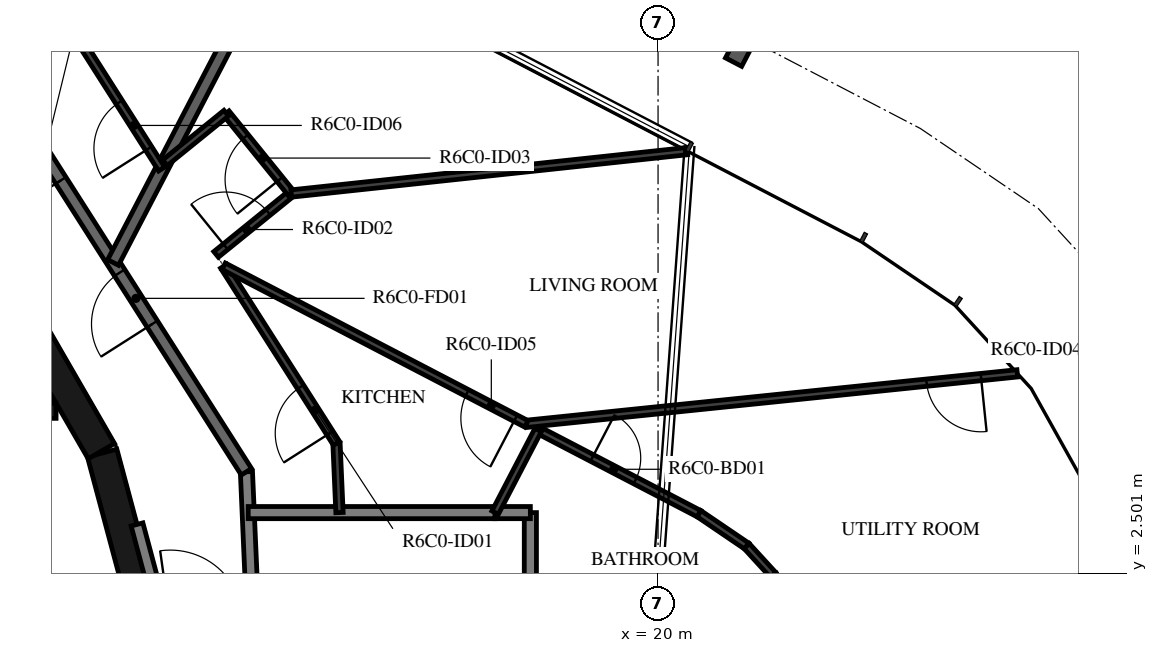
"""IFC4 building model, lengths in metres.
Left out: names, types, materials, properties, quantities, classifications, styles, units other than length and angle.
Written with IfcOpenShell. Run it as: python <this file> out.ifc"""

import sys

from ifc_helpers import new_model, si_unit, direction, frame, frame_2d, origin, origin_2d, place, context, subcontext, project, spatial, rectangle, i_section, extrude, element, fill, save


model = new_model("IFC4")
c1 = context("Model", 3, precision=1e-05, world=origin(), true_north=direction((0.0, 1.0)))
c2 = subcontext(c1, "Body", "Model", "MODEL_VIEW")
j1 = project(units=[si_unit("LENGTHUNIT", "METRE"), si_unit("PLANEANGLEUNIT", "RADIAN")], contexts=[c1])
p1 = place(None, origin())
s1 = spatial("IfcSite", under=j1, at=p1, CompositionType="ELEMENT")
p2 = place(p1, origin())
s2 = spatial("IfcBuilding", under=s1, at=p2, CompositionType="ELEMENT")
p3 = place(p2, frame((0.0, 0.0, 254.7)))
s3 = spatial("IfcBuildingStorey", under=s2, at=p3, CompositionType="ELEMENT", Elevation=254.7)
p4 = place(p3, frame((21.45, 11.308, -0.38), z_axis=(0.0, 0.0, 1.0), x_axis=(0.887010710334, -0.461748849216, 0.0)))
e1 = element("IfcColumn", 1, at=p4, inside=s3, PredefinedType="COLUMN", context=c2, shape_type="SweptSolid", body=[
    extrude(i_section(OverallWidth=0.3, OverallDepth=0.9, WebThickness=0.019, FlangeThickness=0.035, FilletRadius=0.03, at=origin_2d()), origin(), (0.0, 0.0, 1.0), 2.616),
])
for number, where, z_axis, x_axis in (
    (2, (11.643, 1.55, 0.0), (0.0, 0.0, 1.0), (-0.259, 0.966, 0.0)),
    (3, (10.845, 4.51, 0.0), (0.0, 0.0, 1.0), (-0.5, 0.866, 0.0)),
):
    element("IfcWall", number, at=place(p3, frame(where, z_axis=z_axis, x_axis=x_axis)), inside=s3, PredefinedType="SHEAR", context=c2, shape_type="SweptSolid", body=[
        extrude(rectangle(XDim=3.033, YDim=0.5, at=frame_2d((1.516, 0.0))), origin(), (0.0, 0.0, 1.0), 3.05),
    ])
p5 = place(p3, frame((7.0, 5.175, 0.0), z_axis=(0.0, 0.0, 1.0), x_axis=(1.0, 0.0, 0.0)))
e4 = element("IfcWall", 4, at=p5, inside=s3, PredefinedType="SHEAR", context=c2, shape_type="SweptSolid", body=[
    extrude(rectangle(XDim=3.1, YDim=0.25, at=frame_2d((1.55, 0.0))), origin(), (0.0, 0.0, 1.0), 3.05),
])
p6 = place(p3, frame((11.87, 1.668, 0.0), z_axis=(0.0, 0.0, 1.0), x_axis=(-0.258836880648, 0.965921047093, 0.0)))
e5 = element("IfcWall", 5, at=p6, inside=s3, PredefinedType="STANDARD", context=c2, shape_type="SweptSolid", body=[
    extrude(rectangle(XDim=1.695, YDim=0.2, at=frame_2d((0.848, 0.0))), origin(), (0.0, 0.0, 1.0), 3.05),
])
p7 = place(p3, frame((13.331, 1.874, 0.0), z_axis=(0.0, 0.0, 1.0), x_axis=(-0.043621457762, 0.999048131184, 0.0)))
e6 = element("IfcWall", 6, at=p7, inside=s3, PredefinedType="STANDARD", context=c2, shape_type="SweptSolid", body=[
    extrude(rectangle(XDim=2.3, YDim=0.2, at=frame_2d((1.15, 0.0))), origin(), (0.0, 0.0, 1.0), 3.05),
])
p8 = place(p3, frame((13.231, 4.172, 0.0), z_axis=(0.0, 0.0, 1.0), x_axis=(-0.537304397561, 0.843388394728, 0.0)))
e7 = element("IfcWall", 7, at=p8, inside=s3, PredefinedType="STANDARD", context=c2, shape_type="SweptSolid", body=[
    extrude(rectangle(XDim=7.181, YDim=0.2, at=frame_2d((3.59, 0.0))), origin(), (0.0, 0.0, 1.0), 3.05),
])
p9 = place(p8, frame((2.881, 0.0, 0.0)))
e8 = element("IfcOpeningElement", 8, at=p9, cuts=e7, PredefinedType="OPENING", context=c2, shape_type="SweptSolid", body=[
    extrude(rectangle(XDim=1.0, YDim=2.1, at=frame_2d((0.5, 1.05))), frame((0.0, 0.11, 0.0), z_axis=(0.0, -1.0, 0.0), x_axis=(1.0, 0.0, 0.0)), (0.0, 0.0, 1.0), 0.22),
])
p10 = place(p8, frame((5.681, 0.0, 0.0)))
e9 = element("IfcOpeningElement", 9, at=p10, cuts=e7, PredefinedType="OPENING", context=c2, shape_type="SweptSolid", body=[
    extrude(rectangle(XDim=1.0, YDim=2.1, at=frame_2d((0.5, 1.05))), frame((0.0, 0.11, 0.0), z_axis=(0.0, -1.0, 0.0), x_axis=(1.0, 0.0, 0.0)), (0.0, 0.0, 1.0), 0.22),
])
p11 = place(p3, frame((17.321, 3.5, 0.0), z_axis=(0.0, 0.0, 1.0), x_axis=(-1.0, 0.0, 0.0)))
e10 = element("IfcWall", 10, at=p11, inside=s3, PredefinedType="STANDARD", context=c2, shape_type="SweptSolid", body=[
    extrude(rectangle(XDim=4.061, YDim=0.2, at=frame_2d((2.03, 0.0))), origin(), (0.0, 0.0, 1.0), 3.05),
])
p12 = place(p3, frame((17.9, -1.772, 0.0), z_axis=(0.0, 0.0, 1.0), x_axis=(0.0, 1.0, 0.0)))
e11 = element("IfcWall", 11, at=p12, inside=s3, PredefinedType="STANDARD", context=c2, shape_type="SweptSolid", body=[
    extrude(rectangle(XDim=5.272, YDim=0.2, at=frame_2d((2.636, 0.0))), origin(), (0.0, 0.0, 1.0), 3.05),
])
p13 = place(p3, frame((17.9, 3.5, 0.0), z_axis=(0.0, 0.0, 1.0), x_axis=(-1.0, 0.0, 0.0)))
e12 = element("IfcWall", 12, at=p13, inside=s3, PredefinedType="STANDARD", context=c2, shape_type="SweptSolid", body=[
    extrude(rectangle(XDim=0.579, YDim=0.2, at=frame_2d((0.29, 0.0))), origin(), (0.0, 0.0, 1.0), 3.05),
])
p14 = place(p3, frame((13.801, 12.922, 0.0), z_axis=(0.0, 0.0, 1.0), x_axis=(-0.461726485624, -0.887022351733, 0.0)))
e13 = element("IfcWall", 13, at=p14, inside=s3, PredefinedType="STANDARD", context=c2, shape_type="SweptSolid", body=[
    extrude(rectangle(XDim=5.984, YDim=0.2, at=frame_2d((2.992, 0.0))), origin(), (0.0, 0.0, 1.0), 3.05),
])
p15 = place(p3, frame((14.761, 3.5, 0.0), z_axis=(0.0, 0.0, 1.0), x_axis=(-0.04369750018, 0.999044808043, 0.0)))
e14 = element("IfcWall", 14, at=p15, inside=s3, PredefinedType="PARTITIONING", context=c2, shape_type="SweptSolid", body=[
    extrude(rectangle(XDim=1.14, YDim=0.12, at=frame_2d((0.57, 0.0))), origin(), (0.0, 0.0, 1.0), 3.05),
])
p16 = place(p3, frame((14.712, 4.639, 0.0), z_axis=(0.0, 0.0, 1.0), x_axis=(-0.537287126609, 0.843399397427, 0.0)))
e15 = element("IfcWall", 15, at=p16, inside=s3, PredefinedType="PARTITIONING", context=c2, shape_type="SweptSolid", body=[
    extrude(rectangle(XDim=3.453, YDim=0.12, at=frame_2d((1.727, 0.0))), origin(), (0.0, 0.0, 1.0), 3.05),
])
p17 = place(p16, frame((0.2, 0.0, 0.0)))
e16 = element("IfcOpeningElement", 16, at=p17, cuts=e15, PredefinedType="OPENING", context=c2, shape_type="SweptSolid", body=[
    extrude(rectangle(XDim=0.9, YDim=2.1, at=frame_2d((0.45, 1.05))), frame((0.0, 0.07, 0.0), z_axis=(0.0, -1.0, 0.0), x_axis=(1.0, 0.0, 0.0)), (0.0, 0.0, 1.0), 0.14),
])
p18 = place(p3, frame((12.732, 7.746, 0.0), z_axis=(0.0, 0.0, 1.0), x_axis=(0.777187694298, 0.62926885179, 0.0)))
e17 = element("IfcWall", 17, at=p18, inside=s3, PredefinedType="PARTITIONING", context=c2, shape_type="SweptSolid", body=[
    extrude(rectangle(XDim=1.591, YDim=0.12, at=frame_2d((0.795, 0.0))), origin(), (0.0, 0.0, 1.0), 3.05),
])
p19 = place(p18, frame((0.2, 0.0, 0.0)))
e18 = element("IfcOpeningElement", 18, at=p19, cuts=e17, PredefinedType="OPENING", context=c2, shape_type="SweptSolid", body=[
    extrude(rectangle(XDim=0.9, YDim=2.1, at=frame_2d((0.45, 1.05))), frame((0.0, 0.07, 0.0), z_axis=(0.0, -1.0, 0.0), x_axis=(1.0, 0.0, 0.0)), (0.0, 0.0, 1.0), 0.14),
])
p20 = place(p3, frame((13.969, 8.747, 0.0), z_axis=(0.0, 0.0, 1.0), x_axis=(-0.629359312443, 0.777114441921, 0.0)))
e19 = element("IfcWall", 19, at=p20, inside=s3, PredefinedType="PARTITIONING", context=c2, shape_type="SweptSolid", body=[
    extrude(rectangle(XDim=1.7, YDim=0.12, at=frame_2d((0.85, 0.0))), origin(), (0.0, 0.0, 1.0), 3.05),
])
p21 = place(p20, frame((0.3, 0.0, 0.0)))
e20 = element("IfcOpeningElement", 20, at=p21, cuts=e19, PredefinedType="OPENING", context=c2, shape_type="SweptSolid", body=[
    extrude(rectangle(XDim=0.9, YDim=2.1, at=frame_2d((0.45, 1.05))), frame((0.0, 0.07, 0.0), z_axis=(0.0, -1.0, 0.0), x_axis=(1.0, 0.0, 0.0)), (0.0, 0.0, 1.0), 0.14),
])
p22 = place(p3, frame((12.898, 10.069, 0.0), z_axis=(0.0, 0.0, 1.0), x_axis=(-0.777069405334, -0.629414918232, 0.0)))
e21 = element("IfcWall", 21, at=p22, inside=s3, PredefinedType="PARTITIONING", context=c2, shape_type="SweptSolid", body=[
    extrude(rectangle(XDim=1.296, YDim=0.12, at=frame_2d((0.648, 0.0))), origin(), (0.0, 0.0, 1.0), 3.05),
])
p23 = place(p3, frame((18.028, 4.859, 0.0), z_axis=(0.0, 0.0, 1.0), x_axis=(0.88702512027, -0.46172116695, 0.0)))
e22 = element("IfcWall", 22, at=p23, inside=s3, PredefinedType="PARTITIONING", context=c2, shape_type="SweptSolid", body=[
    extrude(rectangle(XDim=2.983, YDim=0.12, at=frame_2d((1.492, 0.0))), origin(), (0.0, 0.0, 1.0), 3.05),
])
p24 = place(p23, frame((1.0, 0.0, 0.0)))
e23 = element("IfcOpeningElement", 23, at=p24, cuts=e22, PredefinedType="OPENING", context=c2, shape_type="SweptSolid", body=[
    extrude(rectangle(XDim=0.8, YDim=2.1, at=frame_2d((0.4, 1.05))), frame((0.0, 0.07, 0.0), z_axis=(0.0, -1.0, 0.0), x_axis=(1.0, 0.0, 0.0)), (0.0, 0.0, 1.0), 0.14),
])
p25 = place(p3, frame((20.674, 3.481, 0.0), z_axis=(0.0, 0.0, 1.0), x_axis=(0.827420148173, -0.56158338508, 0.0)))
e24 = element("IfcWall", 24, at=p25, inside=s3, PredefinedType="PARTITIONING", context=c2, shape_type="SweptSolid", body=[
    extrude(rectangle(XDim=0.947, YDim=0.12, at=frame_2d((0.473, 0.0))), origin(), (0.0, 0.0, 1.0), 3.05),
])
for number, where, z_axis, x_axis in (
    (25, (21.458, 2.95, 0.0), (0.0, 0.0, 1.0), (0.676, -0.737, 0.0)),
    (26, (21.891, 2.477, 0.0), (0.0, 0.0, 1.0), (0.487, -0.873, 0.0)),
):
    element("IfcWall", number, at=place(p3, frame(where, z_axis=z_axis, x_axis=x_axis)), inside=s3, PredefinedType="PARTITIONING", context=c2, shape_type="SweptSolid", body=[
        extrude(rectangle(XDim=0.642, YDim=0.12, at=frame_2d((0.321, 0.0))), origin(), (0.0, 0.0, 1.0), 3.05),
    ])
p26 = place(p3, frame((25.908, 5.79, 0.0), z_axis=(0.0, 0.0, 1.0), x_axis=(-0.994752982456, -0.102305932847, 0.0)))
e27 = element("IfcWall", 27, at=p26, inside=s3, PredefinedType="PARTITIONING", context=c2, shape_type="SweptSolid", body=[
    extrude(rectangle(XDim=8.116, YDim=0.12, at=frame_2d((4.058, 0.0))), origin(), (0.0, 0.0, 1.0), 3.05),
])
p27 = place(p26, frame((0.6, 0.0, 0.0)))
e28 = element("IfcOpeningElement", 28, at=p27, cuts=e27, PredefinedType="OPENING", context=c2, shape_type="SweptSolid", body=[
    extrude(rectangle(XDim=0.9, YDim=2.1, at=frame_2d((0.45, 1.05))), frame((0.0, 0.07, 0.0), z_axis=(0.0, -1.0, 0.0), x_axis=(1.0, 0.0, 0.0)), (0.0, 0.0, 1.0), 0.14),
])
p28 = place(p3, frame((18.028, 4.859, 0.0), z_axis=(0.0, 0.0, 1.0), x_axis=(-0.461688901614, -0.887041914526, 0.0)))
e29 = element("IfcWall", 29, at=p28, inside=s3, PredefinedType="PARTITIONING", context=c2, shape_type="SweptSolid", body=[
    extrude(rectangle(XDim=1.532, YDim=0.12, at=frame_2d((0.766, 0.0))), origin(), (0.0, 0.0, 1.0), 3.05),
])
p29 = place(p3, frame((17.834, 4.96, 0.0), z_axis=(0.0, 0.0, 1.0), x_axis=(-0.887008743782, 0.461752626906, 0.0)))
e30 = element("IfcWall", 30, at=p29, inside=s3, PredefinedType="PARTITIONING", context=c2, shape_type="SweptSolid", body=[
    extrude(rectangle(XDim=5.612, YDim=0.12, at=frame_2d((2.806, 0.0))), origin(), (0.0, 0.0, 1.0), 3.05),
])
p30 = place(p29, frame((0.2, 0.0, 0.0)))
e31 = element("IfcOpeningElement", 31, at=p30, cuts=e30, PredefinedType="OPENING", context=c2, shape_type="SweptSolid", body=[
    extrude(rectangle(XDim=0.9, YDim=2.1, at=frame_2d((0.45, 1.05))), frame((0.0, 0.07, 0.0), z_axis=(0.0, -1.0, 0.0), x_axis=(1.0, 0.0, 0.0)), (0.0, 0.0, 1.0), 0.14),
])
p31 = place(p3, frame((20.48, 9.445, 0.0), z_axis=(0.0, 0.0, 1.0), x_axis=(-0.994311974195, -0.106506797776, 0.0)))
e32 = element("IfcWall", 32, at=p31, inside=s3, PredefinedType="PARTITIONING", context=c2, shape_type="SweptSolid", body=[
    extrude(rectangle(XDim=6.549, YDim=0.12, at=frame_2d((3.274, 0.0))), origin(), (0.0, 0.0, 1.0), 3.05),
])
p32 = place(p3, frame((11.838, 9.15, 0.0), z_axis=(0.0, 0.0, 1.0), x_axis=(-0.537288949014, 0.843398236462, 0.0)))
e33 = element("IfcWall", 33, at=p32, inside=s3, PredefinedType="PARTITIONING", context=c2, shape_type="SweptSolid", body=[
    extrude(rectangle(XDim=2.636, YDim=0.12, at=frame_2d((1.318, 0.0))), origin(), (0.0, 0.0, 1.0), 3.05),
])
p33 = place(p32, frame((0.4, 0.0, 0.0)))
e34 = element("IfcOpeningElement", 34, at=p33, cuts=e33, PredefinedType="OPENING", context=c2, shape_type="SweptSolid", body=[
    extrude(rectangle(XDim=0.9, YDim=2.1, at=frame_2d((0.45, 1.05))), frame((0.0, 0.07, 0.0), z_axis=(0.0, -1.0, 0.0), x_axis=(1.0, 0.0, 0.0)), (0.0, 0.0, 1.0), 0.14),
])
p34 = place(p9, origin())
e35 = element("IfcDoor", 35, at=p34, inside=s3, OperationType="SINGLE_SWING_LEFT", PredefinedType="DOOR", context=c2, shape_type="SweptSolid", body=[
    extrude(rectangle(XDim=1.0, YDim=2.1, at=frame_2d((0.5, 1.05))), frame((0.0, 0.025, 0.0), z_axis=(0.0, -1.0, 0.0), x_axis=(1.0, 0.0, 0.0)), (0.0, 0.0, 1.0), 0.05),
])
fill(e8, e35)
p35 = place(p17, origin())
e36 = element("IfcDoor", 36, at=p35, inside=s3, OperationType="SINGLE_SWING_LEFT", PredefinedType="DOOR", context=c2, shape_type="SweptSolid", body=[
    extrude(rectangle(XDim=0.9, YDim=2.1, at=frame_2d((0.45, 1.05))), frame((0.0, 0.025, 0.0), z_axis=(0.0, -1.0, 0.0), x_axis=(1.0, 0.0, 0.0)), (0.0, 0.0, 1.0), 0.05),
])
fill(e16, e36)
p36 = place(p19, origin())
e37 = element("IfcDoor", 37, at=p36, inside=s3, OperationType="SINGLE_SWING_RIGHT", PredefinedType="DOOR", context=c2, shape_type="SweptSolid", body=[
    extrude(rectangle(XDim=0.9, YDim=2.1, at=frame_2d((0.45, 1.05))), frame((0.0, 0.025, 0.0), z_axis=(0.0, -1.0, 0.0), x_axis=(1.0, 0.0, 0.0)), (0.0, 0.0, 1.0), 0.05),
])
fill(e18, e37)
p37 = place(p21, origin())
e38 = element("IfcDoor", 38, at=p37, inside=s3, OperationType="SINGLE_SWING_LEFT", PredefinedType="DOOR", context=c2, shape_type="SweptSolid", body=[
    extrude(rectangle(XDim=0.9, YDim=2.1, at=frame_2d((0.45, 1.05))), frame((0.0, 0.025, 0.0), z_axis=(0.0, -1.0, 0.0), x_axis=(1.0, 0.0, 0.0)), (0.0, 0.0, 1.0), 0.05),
])
fill(e20, e38)
p38 = place(p27, origin())
e39 = element("IfcDoor", 39, at=p38, inside=s3, OperationType="SINGLE_SWING_LEFT", PredefinedType="DOOR", context=c2, shape_type="SweptSolid", body=[
    extrude(rectangle(XDim=0.9, YDim=2.1, at=frame_2d((0.45, 1.05))), frame((0.0, 0.025, 0.0), z_axis=(0.0, -1.0, 0.0), x_axis=(1.0, 0.0, 0.0)), (0.0, 0.0, 1.0), 0.05),
])
fill(e28, e39)
p39 = place(p24, origin())
e40 = element("IfcDoor", 40, at=p39, inside=s3, OperationType="SINGLE_SWING_RIGHT", PredefinedType="DOOR", context=c2, shape_type="SweptSolid", body=[
    extrude(rectangle(XDim=0.8, YDim=2.1, at=frame_2d((0.4, 1.05))), frame((0.0, 0.025, 0.0), z_axis=(0.0, -1.0, 0.0), x_axis=(1.0, 0.0, 0.0)), (0.0, 0.0, 1.0), 0.05),
])
fill(e23, e40)
p40 = place(p30, origin())
e41 = element("IfcDoor", 41, at=p40, inside=s3, OperationType="SINGLE_SWING_RIGHT", PredefinedType="DOOR", context=c2, shape_type="SweptSolid", body=[
    extrude(rectangle(XDim=0.9, YDim=2.1, at=frame_2d((0.45, 1.05))), frame((0.0, 0.025, 0.0), z_axis=(0.0, -1.0, 0.0), x_axis=(1.0, 0.0, 0.0)), (0.0, 0.0, 1.0), 0.05),
])
fill(e31, e41)
p41 = place(p10, origin())
e42 = element("IfcDoor", 42, at=p41, inside=s3, OperationType="SINGLE_SWING_LEFT", PredefinedType="DOOR", context=c2, shape_type="SweptSolid", body=[
    extrude(rectangle(XDim=1.0, YDim=2.1, at=frame_2d((0.5, 1.05))), frame((0.0, 0.025, 0.0), z_axis=(0.0, -1.0, 0.0), x_axis=(1.0, 0.0, 0.0)), (0.0, 0.0, 1.0), 0.05),
])
fill(e9, e42)
p42 = place(p33, origin())
e43 = element("IfcDoor", 43, at=p42, inside=s3, OperationType="SINGLE_SWING_LEFT", PredefinedType="DOOR", context=c2, shape_type="SweptSolid", body=[
    extrude(rectangle(XDim=0.9, YDim=2.1, at=frame_2d((0.45, 1.05))), frame((0.0, 0.025, 0.0), z_axis=(0.0, -1.0, 0.0), x_axis=(1.0, 0.0, 0.0)), (0.0, 0.0, 1.0), 0.05),
])
fill(e34, e43)
save(model, sys.argv[1])
